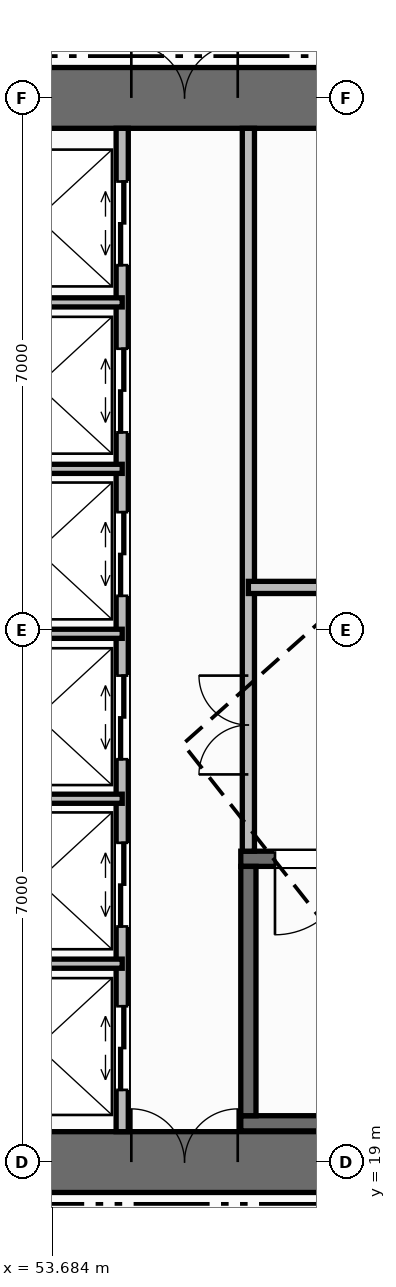
"""IFC4 building model, lengths in metres.
Left out: names, types, materials, properties, quantities, classifications, styles, units other than length and angle.
Written with IfcOpenShell. Run it as: python <this file> out.ifc"""

import sys

from ifc_helpers import new_model, si_unit, direction, frame, frame_2d, origin, place, context, subcontext, project, spatial, rectangle, extrude, element, fill, save


model = new_model("IFC4")
c1 = context("Model", 3, precision=1e-05, world=origin(), true_north=direction((0.0, 1.0)))
c2 = subcontext(c1, "Body", "Model", "MODEL_VIEW")
j1 = project(units=[si_unit("LENGTHUNIT", "METRE"), si_unit("PLANEANGLEUNIT", "RADIAN")], contexts=[c1])
p1 = place(None, origin())
s1 = spatial("IfcSite", under=j1, at=p1, CompositionType="ELEMENT")
p2 = place(p1, origin())
s2 = spatial("IfcBuilding", under=s1, at=p2, CompositionType="ELEMENT")
p3 = place(p2, origin())
s3 = spatial("IfcBuildingStorey", under=s2, at=p3, CompositionType="ELEMENT", Elevation=0.0)
p4 = place(p3, frame((51.6, 19.0, 0.0), z_axis=(0.0, 0.0, 1.0), x_axis=(1.0, 0.0, 0.0)))
e1 = element("IfcWall", 1, at=p4, inside=s3, PredefinedType="SHEAR", context=c2, shape_type="SweptSolid", body=[
    extrude(rectangle(XDim=13.8, YDim=0.8, at=frame_2d((6.9, 0.0))), origin(), (0.0, 0.0, 1.0), 6.0),
])
p5 = place(p4, frame((3.12, 0.0, 0.0)))
e2 = element("IfcOpeningElement", 2, at=p5, cuts=e1, PredefinedType="OPENING", context=c2, shape_type="SweptSolid", body=[
    extrude(rectangle(XDim=1.4, YDim=2.2, at=frame_2d((0.7, 1.1))), frame((0.0, 0.41, 0.0), z_axis=(0.0, -1.0, 0.0), x_axis=(1.0, 0.0, 0.0)), (0.0, 0.0, 1.0), 0.82),
])
p6 = place(p3, frame((51.6, 33.0, 0.0), z_axis=(0.0, 0.0, 1.0), x_axis=(1.0, 0.0, 0.0)))
e3 = element("IfcWall", 3, at=p6, inside=s3, PredefinedType="SHEAR", context=c2, shape_type="SweptSolid", body=[
    extrude(rectangle(XDim=13.8, YDim=0.8, at=frame_2d((6.9, 0.0))), origin(), (0.0, 0.0, 1.0), 6.0),
])
p7 = place(p6, frame((3.12, 0.0, 0.0)))
e4 = element("IfcOpeningElement", 4, at=p7, cuts=e3, PredefinedType="OPENING", context=c2, shape_type="SweptSolid", body=[
    extrude(rectangle(XDim=1.4, YDim=2.2, at=frame_2d((0.7, 1.1))), frame((0.0, 0.41, 0.0), z_axis=(0.0, -1.0, 0.0), x_axis=(1.0, 0.0, 0.0)), (0.0, 0.0, 1.0), 0.82),
])
p8 = place(p6, frame((11.0, 0.0, 0.0)))
e5 = element("IfcOpeningElement", 5, at=p8, cuts=e3, PredefinedType="OPENING", context=c2, shape_type="SweptSolid", body=[
    extrude(rectangle(XDim=0.9, YDim=2.15, at=frame_2d((0.45, 1.075))), frame((0.0, 0.41, 0.0), z_axis=(0.0, -1.0, 0.0), x_axis=(1.0, 0.0, 0.0)), (0.0, 0.0, 1.0), 0.82),
])
p9 = place(p6, frame((6.4, 0.0, 0.0)))
e6 = element("IfcOpeningElement", 6, at=p9, cuts=e3, PredefinedType="OPENING", context=c2, shape_type="SweptSolid", body=[
    extrude(rectangle(XDim=0.95, YDim=2.15, at=frame_2d((0.475, 1.075))), frame((0.0, 0.41, 0.0), z_axis=(0.0, -1.0, 0.0), x_axis=(1.0, 0.0, 0.0)), (0.0, 0.0, 1.0), 0.82),
])
p10 = place(p6, frame((8.85, 0.0, 0.0)))
e7 = element("IfcOpeningElement", 7, at=p10, cuts=e3, PredefinedType="OPENING", context=c2, shape_type="SweptSolid", body=[
    extrude(rectangle(XDim=0.9, YDim=2.15, at=frame_2d((0.45, 1.075))), frame((0.0, 0.41, 0.0), z_axis=(0.0, -1.0, 0.0), x_axis=(1.0, 0.0, 0.0)), (0.0, 0.0, 1.0), 0.82),
])
p11 = place(p3, frame((56.16, 19.51, 0.0), z_axis=(0.0, 0.0, 1.0), x_axis=(1.0, 0.0, 0.0)))
e8 = element("IfcWall", 8, at=p11, inside=s3, PredefinedType="SHEAR", context=c2, shape_type="SweptSolid", body=[
    extrude(rectangle(XDim=8.43, YDim=0.2, at=frame_2d((4.215, 0.0))), origin(), (0.0, 0.0, 1.0), 6.0),
])
p12 = place(p3, frame((56.16, 22.99, 0.0), z_axis=(0.0, 0.0, 1.0), x_axis=(1.0, 0.0, 0.0)))
e9 = element("IfcWall", 9, at=p12, inside=s3, PredefinedType="SHEAR", context=c2, shape_type="SweptSolid", body=[
    extrude(rectangle(XDim=8.43, YDim=0.2, at=frame_2d((4.215, 0.0))), origin(), (0.0, 0.0, 1.0), 6.0),
])
p13 = place(p12, frame((0.45, 0.0, 0.0)))
e10 = element("IfcOpeningElement", 10, at=p13, cuts=e9, PredefinedType="OPENING", context=c2, shape_type="SweptSolid", body=[
    extrude(rectangle(XDim=1.0, YDim=2.15, at=frame_2d((0.5, 1.075))), frame((0.0, 0.11, 0.0), z_axis=(0.0, -1.0, 0.0), x_axis=(1.0, 0.0, 0.0)), (0.0, 0.0, 1.0), 0.22),
])
p14 = place(p3, frame((56.26, 19.61, 0.0), z_axis=(0.0, 0.0, 1.0), x_axis=(0.0, 1.0, 0.0)))
e11 = element("IfcWall", 11, at=p14, inside=s3, PredefinedType="SHEAR", context=c2, shape_type="SweptSolid", body=[
    extrude(rectangle(XDim=3.28, YDim=0.2, at=frame_2d((1.64, 0.0))), origin(), (0.0, 0.0, 1.0), 6.0),
])
p15 = place(p3, frame((54.6, 19.4, 0.0), z_axis=(0.0, 0.0, 1.0), x_axis=(0.0, 1.0, 0.0)))
e12 = element("IfcWall", 12, at=p15, inside=s3, PredefinedType="STANDARD", context=c2, shape_type="SweptSolid", body=[
    extrude(rectangle(XDim=13.2, YDim=0.16, at=frame_2d((6.6, 0.0))), origin(), (0.0, 0.0, 1.0), 5.72),
])
p16 = place(p15, frame((0.55, 0.0, 0.0)))
e13 = element("IfcOpeningElement", 13, at=p16, cuts=e12, PredefinedType="OPENING", context=c2, shape_type="SweptSolid", body=[
    extrude(rectangle(XDim=1.1, YDim=2.2, at=frame_2d((0.55, 1.1))), frame((0.0, 0.09, 0.0), z_axis=(0.0, -1.0, 0.0), x_axis=(1.0, 0.0, 0.0)), (0.0, 0.0, 1.0), 0.18),
])
p17 = place(p15, frame((2.7, 0.0, 0.0)))
e14 = element("IfcOpeningElement", 14, at=p17, cuts=e12, PredefinedType="OPENING", context=c2, shape_type="SweptSolid", body=[
    extrude(rectangle(XDim=1.1, YDim=2.2, at=frame_2d((0.55, 1.1))), frame((0.0, 0.09, 0.0), z_axis=(0.0, -1.0, 0.0), x_axis=(1.0, 0.0, 0.0)), (0.0, 0.0, 1.0), 0.18),
])
p18 = place(p15, frame((4.9, 0.0, 0.0)))
e15 = element("IfcOpeningElement", 15, at=p18, cuts=e12, PredefinedType="OPENING", context=c2, shape_type="SweptSolid", body=[
    extrude(rectangle(XDim=1.1, YDim=2.2, at=frame_2d((0.55, 1.1))), frame((0.0, 0.09, 0.0), z_axis=(0.0, -1.0, 0.0), x_axis=(1.0, 0.0, 0.0)), (0.0, 0.0, 1.0), 0.18),
])
p19 = place(p15, frame((7.05, 0.0, 0.0)))
e16 = element("IfcOpeningElement", 16, at=p19, cuts=e12, PredefinedType="OPENING", context=c2, shape_type="SweptSolid", body=[
    extrude(rectangle(XDim=1.1, YDim=2.2, at=frame_2d((0.55, 1.1))), frame((0.0, 0.09, 0.0), z_axis=(0.0, -1.0, 0.0), x_axis=(1.0, 0.0, 0.0)), (0.0, 0.0, 1.0), 0.18),
])
p20 = place(p15, frame((9.2, 0.0, 0.0)))
e17 = element("IfcOpeningElement", 17, at=p20, cuts=e12, PredefinedType="OPENING", context=c2, shape_type="SweptSolid", body=[
    extrude(rectangle(XDim=1.1, YDim=2.2, at=frame_2d((0.55, 1.1))), frame((0.0, 0.09, 0.0), z_axis=(0.0, -1.0, 0.0), x_axis=(1.0, 0.0, 0.0)), (0.0, 0.0, 1.0), 0.18),
])
p21 = place(p15, frame((11.4, 0.0, 0.0)))
e18 = element("IfcOpeningElement", 18, at=p21, cuts=e12, PredefinedType="OPENING", context=c2, shape_type="SweptSolid", body=[
    extrude(rectangle(XDim=1.1, YDim=2.2, at=frame_2d((0.55, 1.1))), frame((0.0, 0.09, 0.0), z_axis=(0.0, -1.0, 0.0), x_axis=(1.0, 0.0, 0.0)), (0.0, 0.0, 1.0), 0.18),
])
p22 = place(p3, frame((56.26, 23.09, 0.0), z_axis=(0.0, 0.0, 1.0), x_axis=(0.0, 1.0, 0.0)))
e19 = element("IfcWall", 19, at=p22, inside=s3, PredefinedType="STANDARD", context=c2, shape_type="SweptSolid", body=[
    extrude(rectangle(XDim=9.51, YDim=0.16, at=frame_2d((4.755, 0.0))), origin(), (0.0, 0.0, 1.0), 5.72),
])
p23 = place(p22, frame((1.01, 0.0, 0.0)))
e20 = element("IfcOpeningElement", 20, at=p23, cuts=e19, PredefinedType="OPENING", context=c2, shape_type="SweptSolid", body=[
    extrude(rectangle(XDim=1.3, YDim=2.2, at=frame_2d((0.65, 1.1))), frame((0.0, 0.09, 0.0), z_axis=(0.0, -1.0, 0.0), x_axis=(1.0, 0.0, 0.0)), (0.0, 0.0, 1.0), 0.18),
])
for number, where, z_axis, x_axis in (
    (21, (52.4, 21.61, 0.0), (0.0, 0.0, 1.0), (1.0, 0.0, 0.0)),
    (22, (52.4, 23.78, 0.0), (0.0, 0.0, 1.0), (1.0, 0.0, 0.0)),
    (23, (52.4, 25.95, 0.0), (0.0, 0.0, 1.0), (1.0, 0.0, 0.0)),
    (24, (52.4, 28.12, 0.0), (0.0, 0.0, 1.0), (1.0, 0.0, 0.0)),
    (25, (52.4, 30.31, 0.0), (0.0, 0.0, 1.0), (1.0, 0.0, 0.0)),
):
    element("IfcWall", number, at=place(p3, frame(where, z_axis=z_axis, x_axis=x_axis)), inside=s3, PredefinedType="PARTITIONING", context=c2, shape_type="SweptSolid", body=[
        extrude(rectangle(XDim=2.2, YDim=0.12, at=frame_2d((1.1, 0.0))), origin(), (0.0, 0.0, 1.0), 5.72),
    ])
p24 = place(p3, frame((56.26, 26.56, 0.0), z_axis=(0.0, 0.0, 1.0), x_axis=(1.0, 0.0, 0.0)))
e26 = element("IfcWall", 26, at=p24, inside=s3, PredefinedType="STANDARD", context=c2, shape_type="SweptSolid", body=[
    extrude(rectangle(XDim=8.34, YDim=0.16, at=frame_2d((4.17, 0.0))), origin(), (0.0, 0.0, 1.0), 5.72),
])
p25 = place(p5, origin())
e27 = element("IfcDoor", 27, at=p25, inside=s3, OperationType="DOUBLE_DOOR_SINGLE_SWING", PredefinedType="DOOR", context=c2, shape_type="SweptSolid", body=[
    extrude(rectangle(XDim=1.4, YDim=2.2, at=frame_2d((0.7, 1.1))), frame((0.0, 0.125, 0.0), z_axis=(0.0, -1.0, 0.0), x_axis=(1.0, 0.0, 0.0)), (0.0, 0.0, 1.0), 0.05),
])
fill(e2, e27)
p26 = place(p7, origin())
e28 = element("IfcDoor", 28, at=p26, inside=s3, OperationType="DOUBLE_DOOR_SINGLE_SWING", PredefinedType="DOOR", context=c2, shape_type="SweptSolid", body=[
    extrude(rectangle(XDim=1.4, YDim=2.2, at=frame_2d((0.7, 1.1))), frame((0.0, -0.075, 0.0), z_axis=(0.0, -1.0, 0.0), x_axis=(1.0, 0.0, 0.0)), (0.0, 0.0, 1.0), 0.05),
])
fill(e4, e28)
p27 = place(p16, origin())
e29 = element("IfcDoor", 29, at=p27, inside=s3, OperationType="DOUBLE_DOOR_SLIDING", PredefinedType="DOOR", context=c2, shape_type="SweptSolid", body=[
    extrude(rectangle(XDim=1.1, YDim=2.2, at=frame_2d((0.55, 1.1))), frame((0.0, 0.025, 0.0), z_axis=(0.0, -1.0, 0.0), x_axis=(1.0, 0.0, 0.0)), (0.0, 0.0, 1.0), 0.05),
])
fill(e13, e29)
p28 = place(p17, origin())
e30 = element("IfcDoor", 30, at=p28, inside=s3, OperationType="DOUBLE_DOOR_SLIDING", PredefinedType="DOOR", context=c2, shape_type="SweptSolid", body=[
    extrude(rectangle(XDim=1.1, YDim=2.2, at=frame_2d((0.55, 1.1))), frame((0.0, 0.025, 0.0), z_axis=(0.0, -1.0, 0.0), x_axis=(1.0, 0.0, 0.0)), (0.0, 0.0, 1.0), 0.05),
])
fill(e14, e30)
p29 = place(p18, origin())
e31 = element("IfcDoor", 31, at=p29, inside=s3, OperationType="DOUBLE_DOOR_SLIDING", PredefinedType="DOOR", context=c2, shape_type="SweptSolid", body=[
    extrude(rectangle(XDim=1.1, YDim=2.2, at=frame_2d((0.55, 1.1))), frame((0.0, 0.025, 0.0), z_axis=(0.0, -1.0, 0.0), x_axis=(1.0, 0.0, 0.0)), (0.0, 0.0, 1.0), 0.05),
])
fill(e15, e31)
p30 = place(p19, origin())
e32 = element("IfcDoor", 32, at=p30, inside=s3, OperationType="DOUBLE_DOOR_SLIDING", PredefinedType="DOOR", context=c2, shape_type="SweptSolid", body=[
    extrude(rectangle(XDim=1.1, YDim=2.2, at=frame_2d((0.55, 1.1))), frame((0.0, 0.025, 0.0), z_axis=(0.0, -1.0, 0.0), x_axis=(1.0, 0.0, 0.0)), (0.0, 0.0, 1.0), 0.05),
])
fill(e16, e32)
p31 = place(p20, origin())
e33 = element("IfcDoor", 33, at=p31, inside=s3, OperationType="DOUBLE_DOOR_SLIDING", PredefinedType="DOOR", context=c2, shape_type="SweptSolid", body=[
    extrude(rectangle(XDim=1.1, YDim=2.2, at=frame_2d((0.55, 1.1))), frame((0.0, 0.025, 0.0), z_axis=(0.0, -1.0, 0.0), x_axis=(1.0, 0.0, 0.0)), (0.0, 0.0, 1.0), 0.05),
])
fill(e17, e33)
p32 = place(p21, origin())
e34 = element("IfcDoor", 34, at=p32, inside=s3, OperationType="DOUBLE_DOOR_SLIDING", PredefinedType="DOOR", context=c2, shape_type="SweptSolid", body=[
    extrude(rectangle(XDim=1.1, YDim=2.2, at=frame_2d((0.55, 1.1))), frame((0.0, 0.025, 0.0), z_axis=(0.0, -1.0, 0.0), x_axis=(1.0, 0.0, 0.0)), (0.0, 0.0, 1.0), 0.05),
])
fill(e18, e34)
p33 = place(p13, origin())
e35 = element("IfcDoor", 35, at=p33, inside=s3, OperationType="SINGLE_SWING_RIGHT", PredefinedType="DOOR", context=c2, shape_type="SweptSolid", body=[
    extrude(rectangle(XDim=1.0, YDim=2.15, at=frame_2d((0.5, 1.075))), frame((0.0, 0.025, 0.0), z_axis=(0.0, -1.0, 0.0), x_axis=(1.0, 0.0, 0.0)), (0.0, 0.0, 1.0), 0.05),
])
fill(e10, e35)
p34 = place(p23, origin())
e36 = element("IfcDoor", 36, at=p34, inside=s3, OperationType="DOUBLE_DOOR_SINGLE_SWING", PredefinedType="DOOR", context=c2, shape_type="SweptSolid", body=[
    extrude(rectangle(XDim=1.3, YDim=2.2, at=frame_2d((0.65, 1.1))), frame((0.0, 0.025, 0.0), z_axis=(0.0, -1.0, 0.0), x_axis=(1.0, 0.0, 0.0)), (0.0, 0.0, 1.0), 0.05),
])
fill(e20, e36)
save(model, sys.argv[1])
